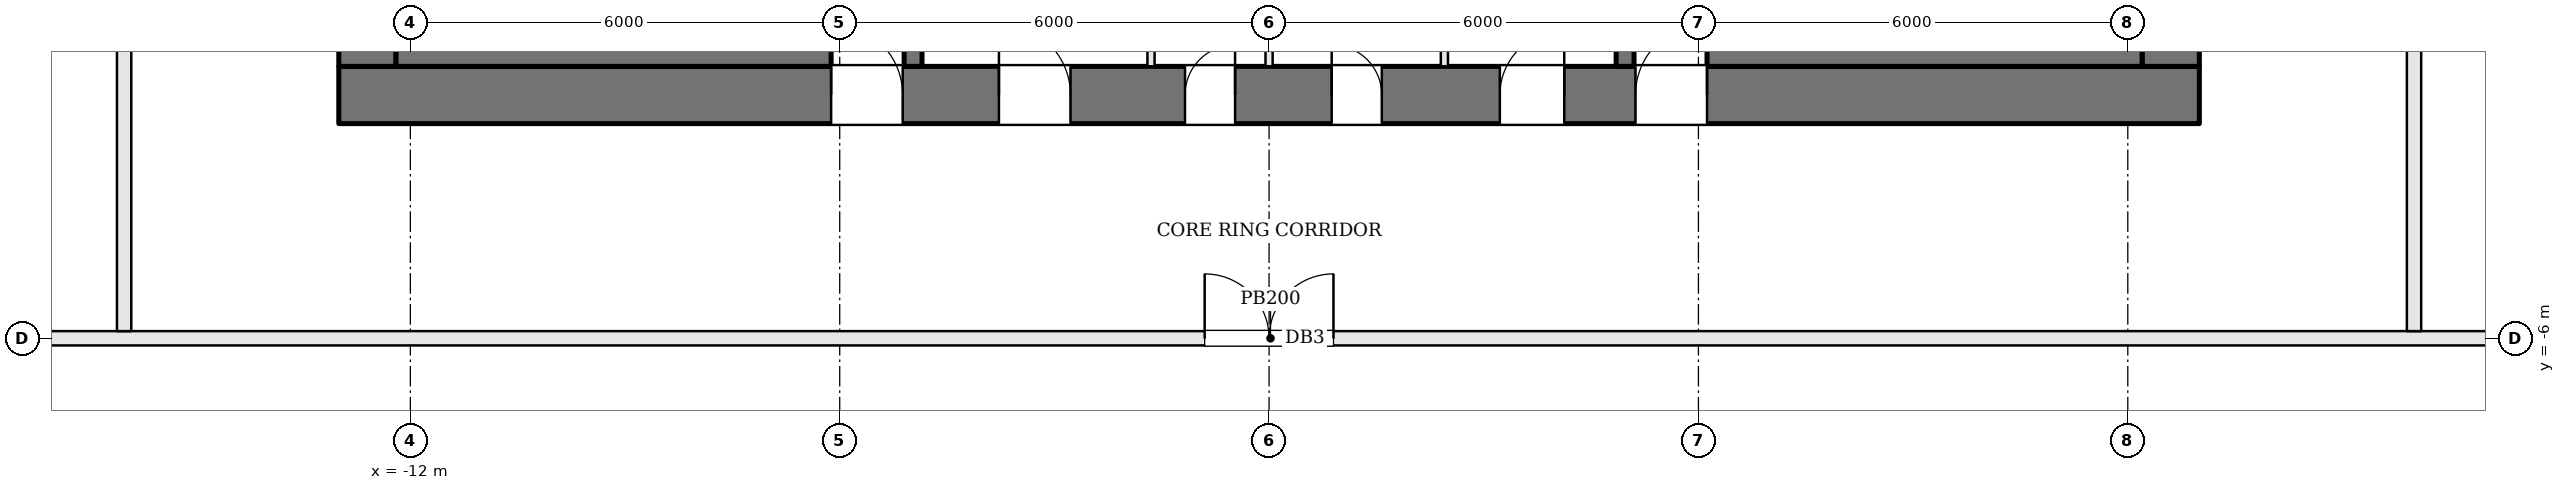
"""IFC4 building model, lengths in metres.
Left out: names, types, materials, properties, quantities, classifications, styles, units other than length and angle.
Written with IfcOpenShell. Run it as: python <this file> out.ifc"""

import sys

from ifc_helpers import new_model, si_unit, direction, frame, frame_2d, origin, place, context, subcontext, project, spatial, rectangle, extrude, element, fill, save


model = new_model("IFC4")
c1 = context("Model", 3, precision=1e-05, world=origin(), true_north=direction((0.0, 1.0)))
c2 = subcontext(c1, "Body", "Model", "MODEL_VIEW")
j1 = project(units=[si_unit("LENGTHUNIT", "METRE"), si_unit("PLANEANGLEUNIT", "RADIAN")], contexts=[c1])
p1 = place(None, origin())
s1 = spatial("IfcSite", under=j1, at=p1, CompositionType="ELEMENT")
p2 = place(p1, origin())
s2 = spatial("IfcBuilding", under=s1, at=p2, CompositionType="ELEMENT")
p3 = place(p2, frame((0.0, 0.0, 240.9)))
s3 = spatial("IfcBuildingStorey", under=s2, at=p3, CompositionType="ELEMENT", Elevation=240.9)
p4 = place(p3, frame((-13.0, -2.6, 0.0), z_axis=(0.0, 0.0, 1.0), x_axis=(1.0, 0.0, 0.0)))
e1 = element("IfcWall", 1, at=p4, inside=s3, PredefinedType="SHEAR", context=c2, shape_type="SweptSolid", body=[
    extrude(rectangle(XDim=26.0, YDim=0.8, at=frame_2d((13.0, 0.0))), origin(), (0.0, 0.0, 1.0), 3.9),
])
p5 = place(p4, frame((9.225, 0.0, 0.0)))
e2 = element("IfcOpeningElement", 2, at=p5, cuts=e1, PredefinedType="OPENING", context=c2, shape_type="SweptSolid", body=[
    extrude(rectangle(XDim=1.0, YDim=2.1, at=frame_2d((0.5, 1.05))), frame((0.0, 0.41, 0.0), z_axis=(0.0, -1.0, 0.0), x_axis=(1.0, 0.0, 0.0)), (0.0, 0.0, 1.0), 0.82),
])
p6 = place(p4, frame((11.825, 0.0, 0.0)))
e3 = element("IfcOpeningElement", 3, at=p6, cuts=e1, PredefinedType="OPENING", context=c2, shape_type="SweptSolid", body=[
    extrude(rectangle(XDim=0.7, YDim=2.1, at=frame_2d((0.35, 1.05))), frame((0.0, 0.41, 0.0), z_axis=(0.0, -1.0, 0.0), x_axis=(1.0, 0.0, 0.0)), (0.0, 0.0, 1.0), 0.82),
])
p7 = place(p4, frame((13.875, 0.0, 0.0)))
e4 = element("IfcOpeningElement", 4, at=p7, cuts=e1, PredefinedType="OPENING", context=c2, shape_type="SweptSolid", body=[
    extrude(rectangle(XDim=0.7, YDim=2.1, at=frame_2d((0.35, 1.05))), frame((0.0, 0.41, 0.0), z_axis=(0.0, -1.0, 0.0), x_axis=(1.0, 0.0, 0.0)), (0.0, 0.0, 1.0), 0.82),
])
p8 = place(p4, frame((16.225, 0.0, 0.0)))
e5 = element("IfcOpeningElement", 5, at=p8, cuts=e1, PredefinedType="OPENING", context=c2, shape_type="SweptSolid", body=[
    extrude(rectangle(XDim=0.9, YDim=2.1, at=frame_2d((0.45, 1.05))), frame((0.0, 0.41, 0.0), z_axis=(0.0, -1.0, 0.0), x_axis=(1.0, 0.0, 0.0)), (0.0, 0.0, 1.0), 0.82),
])
p9 = place(p4, frame((6.88, 0.0, 0.0)))
e6 = element("IfcOpeningElement", 6, at=p9, cuts=e1, PredefinedType="OPENING", context=c2, shape_type="SweptSolid", body=[
    extrude(rectangle(XDim=1.0, YDim=2.1, at=frame_2d((0.5, 1.05))), frame((0.0, 0.41, 0.0), z_axis=(0.0, -1.0, 0.0), x_axis=(1.0, 0.0, 0.0)), (0.0, 0.0, 1.0), 0.82),
])
p10 = place(p4, frame((18.12, 0.0, 0.0)))
e7 = element("IfcOpeningElement", 7, at=p10, cuts=e1, PredefinedType="OPENING", context=c2, shape_type="SweptSolid", body=[
    extrude(rectangle(XDim=1.0, YDim=2.1, at=frame_2d((0.5, 1.05))), frame((0.0, 0.41, 0.0), z_axis=(0.0, -1.0, 0.0), x_axis=(1.0, 0.0, 0.0)), (0.0, 0.0, 1.0), 0.82),
])
p11 = place(p3, frame((12.6, -2.2, 0.0), z_axis=(0.0, 0.0, 1.0), x_axis=(0.0, 1.0, 0.0)))
e8 = element("IfcWall", 8, at=p11, inside=s3, PredefinedType="SHEAR", context=c2, shape_type="SweptSolid", body=[
    extrude(rectangle(XDim=13.4, YDim=0.8, at=frame_2d((6.7, 0.0))), origin(), (0.0, 0.0, 1.0), 3.9),
])
p12 = place(p11, frame((7.4, 0.0, 0.0)))
e9 = element("IfcOpeningElement", 9, at=p12, cuts=e8, PredefinedType="OPENING", context=c2, shape_type="SweptSolid", body=[
    extrude(rectangle(XDim=1.8, YDim=2.1, at=frame_2d((0.9, 1.05))), frame((0.0, 0.41, 0.0), z_axis=(0.0, -1.0, 0.0), x_axis=(1.0, 0.0, 0.0)), (0.0, 0.0, 1.0), 0.82),
])
p13 = place(p3, frame((-12.6, -2.2, 0.0), z_axis=(0.0, 0.0, 1.0), x_axis=(0.0, 1.0, 0.0)))
e10 = element("IfcWall", 10, at=p13, inside=s3, PredefinedType="SHEAR", context=c2, shape_type="SweptSolid", body=[
    extrude(rectangle(XDim=13.4, YDim=0.8, at=frame_2d((6.7, 0.0))), origin(), (0.0, 0.0, 1.0), 3.9),
])
p14 = place(p13, frame((4.2, 0.0, 0.0)))
e11 = element("IfcOpeningElement", 11, at=p14, cuts=e10, PredefinedType="OPENING", context=c2, shape_type="SweptSolid", body=[
    extrude(rectangle(XDim=1.8, YDim=2.1, at=frame_2d((0.9, 1.05))), frame((0.0, 0.41, 0.0), z_axis=(0.0, -1.0, 0.0), x_axis=(1.0, 0.0, 0.0)), (0.0, 0.0, 1.0), 0.82),
])
p15 = place(p3, frame((-4.975, -2.2, 0.0), z_axis=(0.0, 0.0, 1.0), x_axis=(0.0, 1.0, 0.0)))
e12 = element("IfcWall", 12, at=p15, inside=s3, PredefinedType="SOLIDWALL", context=c2, shape_type="SweptSolid", body=[
    extrude(rectangle(XDim=13.4, YDim=0.25, at=frame_2d((6.7, 0.0))), origin(), (0.0, 0.0, 1.0), 3.7),
])
p16 = place(p15, frame((5.25, 0.0, 0.0)))
e13 = element("IfcOpeningElement", 13, at=p16, cuts=e12, PredefinedType="OPENING", context=c2, shape_type="SweptSolid", body=[
    extrude(rectangle(XDim=1.2, YDim=2.1, at=frame_2d((0.6, 1.05))), frame((0.0, 0.135, 0.0), z_axis=(0.0, -1.0, 0.0), x_axis=(1.0, 0.0, 0.0)), (0.0, 0.0, 1.0), 0.27),
])
p17 = place(p3, frame((4.975, 11.2, 0.0), z_axis=(0.0, 0.0, 1.0), x_axis=(0.0, -1.0, 0.0)))
e14 = element("IfcWall", 14, at=p17, inside=s3, PredefinedType="SOLIDWALL", context=c2, shape_type="SweptSolid", body=[
    extrude(rectangle(XDim=13.4, YDim=0.25, at=frame_2d((6.7, 0.0))), origin(), (0.0, 0.0, 1.0), 3.7),
])
p18 = place(p17, frame((5.25, 0.0, 0.0)))
e15 = element("IfcOpeningElement", 15, at=p18, cuts=e14, PredefinedType="OPENING", context=c2, shape_type="SweptSolid", body=[
    extrude(rectangle(XDim=1.2, YDim=2.1, at=frame_2d((0.6, 1.05))), frame((0.0, 0.135, 0.0), z_axis=(0.0, -1.0, 0.0), x_axis=(1.0, 0.0, 0.0)), (0.0, 0.0, 1.0), 0.27),
])
for number, where, z_axis, x_axis in (
    (16, (-12.2, -1.9, 0.0), (0.0, 0.0, 1.0), (1.0, 0.0, 0.0)),
    (17, (12.2, -1.9, 0.0), (0.0, 0.0, 1.0), (-1.0, 0.0, 0.0)),
):
    element("IfcWall", number, at=place(p3, frame(where, z_axis=z_axis, x_axis=x_axis)), inside=s3, PredefinedType="SOLIDWALL", context=c2, shape_type="SweptSolid", body=[
        extrude(rectangle(XDim=6.08, YDim=0.6, at=frame_2d((3.04, 0.0))), origin(), (0.0, 0.0, 1.0), 3.7),
    ])
for number, where, z_axis, x_axis in (
    (18, (-1.65, -2.2, 0.0), (0.0, 0.0, 1.0), (0.0, 1.0, 0.0)),
    (19, (0.0, -2.2, 0.0), (0.0, 0.0, 1.0), (0.0, 1.0, 0.0)),
    (20, (2.45, -2.2, 0.0), (0.0, 0.0, 1.0), (0.0, 1.0, 0.0)),
):
    element("IfcWall", number, at=place(p3, frame(where, z_axis=z_axis, x_axis=x_axis)), inside=s3, PredefinedType="PARTITIONING", context=c2, shape_type="SweptSolid", body=[
        extrude(rectangle(XDim=2.6, YDim=0.1, at=frame_2d((1.3, 0.0))), origin(), (0.0, 0.0, 1.0), 3.7),
    ])
p19 = place(p3, frame((-21.998, -6.0, 0.0), z_axis=(0.0, 0.0, 1.0), x_axis=(1.0, 0.0, 0.0)))
e21 = element("IfcWall", 21, at=p19, inside=s3, PredefinedType="PARTITIONING", context=c2, shape_type="SweptSolid", body=[
    extrude(rectangle(XDim=44.036, YDim=0.2, at=frame_2d((22.018, 0.0))), origin(), (0.0, 0.0, 1.0), 3.7),
])
p20 = place(p19, frame((21.098, 0.0, 0.0)))
e22 = element("IfcOpeningElement", 22, at=p20, cuts=e21, PredefinedType="OPENING", context=c2, shape_type="SweptSolid", body=[
    extrude(rectangle(XDim=1.8, YDim=2.1, at=frame_2d((0.9, 1.05))), frame((0.0, 0.11, 0.0), z_axis=(0.0, -1.0, 0.0), x_axis=(1.0, 0.0, 0.0)), (0.0, 0.0, 1.0), 0.22),
])
p21 = place(p3, frame((-16.0, 13.047, 0.0), z_axis=(0.0, 0.0, 1.0), x_axis=(0.0, -1.0, 0.0)))
e23 = element("IfcWall", 23, at=p21, inside=s3, PredefinedType="PARTITIONING", context=c2, shape_type="SweptSolid", body=[
    extrude(rectangle(XDim=18.947, YDim=0.2, at=frame_2d((9.474, 0.0))), origin(), (0.0, 0.0, 1.0), 3.7),
])
p22 = place(p21, frame((7.647, 0.0, 0.0)))
e24 = element("IfcOpeningElement", 24, at=p22, cuts=e23, PredefinedType="OPENING", context=c2, shape_type="SweptSolid", body=[
    extrude(rectangle(XDim=1.8, YDim=2.1, at=frame_2d((0.9, 1.05))), frame((0.0, 0.11, 0.0), z_axis=(0.0, -1.0, 0.0), x_axis=(1.0, 0.0, 0.0)), (0.0, 0.0, 1.0), 0.22),
])
p23 = place(p3, frame((16.0, -5.9, 0.0), z_axis=(0.0, 0.0, 1.0), x_axis=(0.0, 1.0, 0.0)))
e25 = element("IfcWall", 25, at=p23, inside=s3, PredefinedType="PARTITIONING", context=c2, shape_type="SweptSolid", body=[
    extrude(rectangle(XDim=18.952, YDim=0.2, at=frame_2d((9.476, 0.0))), origin(), (0.0, 0.0, 1.0), 3.7),
])
p24 = place(p23, frame((9.5, 0.0, 0.0)))
e26 = element("IfcOpeningElement", 26, at=p24, cuts=e25, PredefinedType="OPENING", context=c2, shape_type="SweptSolid", body=[
    extrude(rectangle(XDim=1.8, YDim=2.1, at=frame_2d((0.9, 1.05))), frame((0.0, 0.11, 0.0), z_axis=(0.0, -1.0, 0.0), x_axis=(1.0, 0.0, 0.0)), (0.0, 0.0, 1.0), 0.22),
])
p25 = place(p5, origin())
e27 = element("IfcDoor", 27, at=p25, inside=s3, OperationType="SINGLE_SWING_LEFT", PredefinedType="DOOR", context=c2, shape_type="SweptSolid", body=[
    extrude(rectangle(XDim=1.0, YDim=2.1, at=frame_2d((0.5, 1.05))), frame((0.0, 0.025, 0.0), z_axis=(0.0, -1.0, 0.0), x_axis=(1.0, 0.0, 0.0)), (0.0, 0.0, 1.0), 0.05),
])
fill(e2, e27)
p26 = place(p6, origin())
e28 = element("IfcDoor", 28, at=p26, inside=s3, OperationType="SINGLE_SWING_RIGHT", PredefinedType="DOOR", context=c2, shape_type="SweptSolid", body=[
    extrude(rectangle(XDim=0.7, YDim=2.1, at=frame_2d((0.35, 1.05))), frame((0.0, 0.025, 0.0), z_axis=(0.0, -1.0, 0.0), x_axis=(1.0, 0.0, 0.0)), (0.0, 0.0, 1.0), 0.05),
])
fill(e3, e28)
p27 = place(p7, origin())
e29 = element("IfcDoor", 29, at=p27, inside=s3, OperationType="SINGLE_SWING_LEFT", PredefinedType="DOOR", context=c2, shape_type="SweptSolid", body=[
    extrude(rectangle(XDim=0.7, YDim=2.1, at=frame_2d((0.35, 1.05))), frame((0.0, 0.025, 0.0), z_axis=(0.0, -1.0, 0.0), x_axis=(1.0, 0.0, 0.0)), (0.0, 0.0, 1.0), 0.05),
])
fill(e4, e29)
p28 = place(p8, origin())
e30 = element("IfcDoor", 30, at=p28, inside=s3, OperationType="SINGLE_SWING_RIGHT", PredefinedType="DOOR", context=c2, shape_type="SweptSolid", body=[
    extrude(rectangle(XDim=0.9, YDim=2.1, at=frame_2d((0.45, 1.05))), frame((0.0, 0.025, 0.0), z_axis=(0.0, -1.0, 0.0), x_axis=(1.0, 0.0, 0.0)), (0.0, 0.0, 1.0), 0.05),
])
fill(e5, e30)
p29 = place(p9, origin())
e31 = element("IfcDoor", 31, at=p29, inside=s3, OperationType="SINGLE_SWING_LEFT", PredefinedType="DOOR", context=c2, shape_type="SweptSolid", body=[
    extrude(rectangle(XDim=1.0, YDim=2.1, at=frame_2d((0.5, 1.05))), frame((0.0, 0.025, 0.0), z_axis=(0.0, -1.0, 0.0), x_axis=(1.0, 0.0, 0.0)), (0.0, 0.0, 1.0), 0.05),
])
fill(e6, e31)
p30 = place(p10, origin())
e32 = element("IfcDoor", 32, at=p30, inside=s3, OperationType="SINGLE_SWING_RIGHT", PredefinedType="DOOR", context=c2, shape_type="SweptSolid", body=[
    extrude(rectangle(XDim=1.0, YDim=2.1, at=frame_2d((0.5, 1.05))), frame((0.0, 0.025, 0.0), z_axis=(0.0, -1.0, 0.0), x_axis=(1.0, 0.0, 0.0)), (0.0, 0.0, 1.0), 0.05),
])
fill(e7, e32)
p31 = place(p20, origin())
e33 = element("IfcDoor", 33, at=p31, inside=s3, OperationType="DOUBLE_DOOR_SINGLE_SWING", PredefinedType="DOOR", context=c2, shape_type="SweptSolid", body=[
    extrude(rectangle(XDim=1.8, YDim=2.1, at=frame_2d((0.9, 1.05))), frame((0.0, 0.025, 0.0), z_axis=(0.0, -1.0, 0.0), x_axis=(1.0, 0.0, 0.0)), (0.0, 0.0, 1.0), 0.05),
])
fill(e22, e33)
save(model, sys.argv[1])
